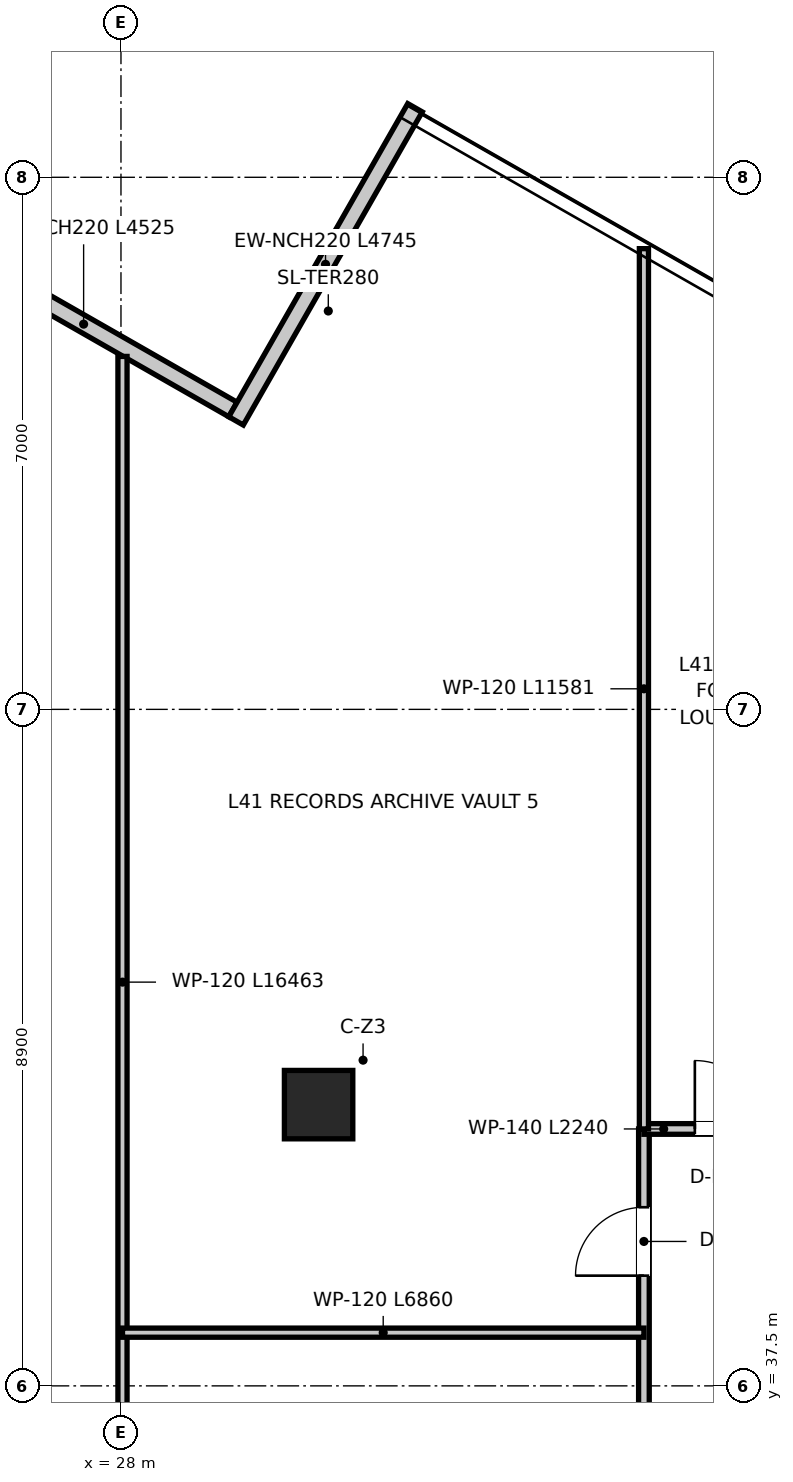
"""IFC4 building model, lengths in metres.
Left out: names, types, materials, properties, quantities, classifications, styles, units other than length and angle.
Written with IfcOpenShell. Run it as: python <this file> out.ifc"""

import sys

from ifc_helpers import new_model, si_unit, direction, frame, frame_2d, origin, origin_2d, place, context, subcontext, project, spatial, rectangle, extrude, source, transform, mapped, element, fill, save


model = new_model("IFC4")
c1 = context("Model", 3, precision=1e-05, world=origin(), true_north=direction((0.0, 1.0)))
c2 = subcontext(c1, "Body", "Model", "MODEL_VIEW")
j1 = project(units=[si_unit("LENGTHUNIT", "METRE"), si_unit("PLANEANGLEUNIT", "RADIAN")], contexts=[c1])
p1 = place(None, origin())
s1 = spatial("IfcSite", under=j1, at=p1, CompositionType="ELEMENT")
p2 = place(p1, origin())
s2 = spatial("IfcBuilding", under=s1, at=p2, CompositionType="ELEMENT")
p3 = place(p2, frame((0.0, 0.0, 169.9)))
s3 = spatial("IfcBuildingStorey", under=s2, at=p3, CompositionType="ELEMENT", Elevation=169.9)
m1 = source(origin(), c2, "Body", "SweptSolid", [
    extrude(rectangle(XDim=0.9, YDim=0.9, at=origin_2d()), origin(), (0.0, 0.0, 1.0), 3.95),
])
p4 = place(p3, frame((30.6, 41.2, 0.0), z_axis=(0.0, 0.0, 1.0), x_axis=(1.0, 0.0, 0.0)))
e1 = element("IfcColumn", 1, at=p4, inside=s3, PredefinedType="COLUMN", context=c2, shape_type="MappedRepresentation", body=[
    mapped(m1, transform((0.0, 0.0, 0.0), x_axis=(1.0, 0.0, 0.0), y_axis=(0.0, 1.0, 0.0), z_axis=(0.0, 0.0, 1.0), scale=1.0)),
])
p5 = place(p3, frame((29.473, 50.345, 0.0), z_axis=(0.0, 0.0, 1.0), x_axis=(-0.868170087613, 0.496266761908, 0.0)))
e2 = element("IfcWall", 2, at=p5, inside=s3, PredefinedType="ELEMENTEDWALL", context=c2, shape_type="SweptSolid", body=[
    extrude(rectangle(XDim=4.525, YDim=0.22, at=frame_2d((2.262, 0.0))), origin(), (0.0, 0.0, 1.0), 3.67),
])
p6 = place(p3, frame((31.868, 54.315, 0.0), z_axis=(0.0, 0.0, 1.0), x_axis=(-0.496205429031, -0.868205144076, 0.0)))
e3 = element("IfcWall", 3, at=p6, inside=s3, PredefinedType="ELEMENTEDWALL", context=c2, shape_type="SweptSolid", body=[
    extrude(rectangle(XDim=4.745, YDim=0.22, at=frame_2d((2.373, 0.0))), origin(), (0.0, 0.0, 1.0), 3.67),
])
p7 = place(p3, frame((34.88, 29.12, 0.0), z_axis=(0.0, 0.0, 1.0), x_axis=(0.0, 1.0, 0.0)))
e4 = element("IfcWall", 4, at=p7, inside=s3, PredefinedType="PARTITIONING", context=c2, shape_type="SweptSolid", body=[
    extrude(rectangle(XDim=11.76, YDim=0.14, at=frame_2d((5.88, 0.0))), origin(), (0.0, 0.0, 1.0), 3.03),
])
p8 = place(p7, frame((4.085, 0.0, 0.0)))
e5 = element("IfcOpeningElement", 5, at=p8, cuts=e4, PredefinedType="OPENING", context=c2, shape_type="SweptSolid", body=[
    extrude(rectangle(XDim=0.95, YDim=2.1, at=frame_2d((0.475, 1.05))), frame((0.0, 0.08, 0.0), z_axis=(0.0, -1.0, 0.0), x_axis=(1.0, 0.0, 0.0)), (0.0, 0.0, 1.0), 0.16),
])
p9 = place(p7, frame((6.82, 0.0, 0.0)))
e6 = element("IfcOpeningElement", 6, at=p9, cuts=e4, PredefinedType="OPENING", context=c2, shape_type="SweptSolid", body=[
    extrude(rectangle(XDim=0.9, YDim=2.1, at=frame_2d((0.45, 1.05))), frame((0.0, 0.08, 0.0), z_axis=(0.0, -1.0, 0.0), x_axis=(1.0, 0.0, 0.0)), (0.0, 0.0, 1.0), 0.16),
])
p10 = place(p7, frame((9.83, 0.0, 0.0)))
e7 = element("IfcOpeningElement", 7, at=p10, cuts=e4, PredefinedType="OPENING", context=c2, shape_type="SweptSolid", body=[
    extrude(rectangle(XDim=0.9, YDim=2.1, at=frame_2d((0.45, 1.05))), frame((0.0, 0.08, 0.0), z_axis=(0.0, -1.0, 0.0), x_axis=(1.0, 0.0, 0.0)), (0.0, 0.0, 1.0), 0.16),
])
p11 = place(p3, frame((34.88, 40.88, 0.0), z_axis=(0.0, 0.0, 1.0), x_axis=(1.0, 0.0, 0.0)))
e8 = element("IfcWall", 8, at=p11, inside=s3, PredefinedType="PARTITIONING", context=c2, shape_type="SweptSolid", body=[
    extrude(rectangle(XDim=2.24, YDim=0.14, at=frame_2d((1.12, 0.0))), origin(), (0.0, 0.0, 1.0), 3.67),
])
p12 = place(p11, frame((0.67, 0.0, 0.0)))
e9 = element("IfcOpeningElement", 9, at=p12, cuts=e8, PredefinedType="OPENING", context=c2, shape_type="SweptSolid", body=[
    extrude(rectangle(XDim=0.9, YDim=2.1, at=frame_2d((0.45, 1.05))), frame((0.0, 0.08, 0.0), z_axis=(0.0, -1.0, 0.0), x_axis=(1.0, 0.0, 0.0)), (0.0, 0.0, 1.0), 0.16),
])
p13 = place(p3, frame((34.88, 40.88, 0.0), z_axis=(0.0, 0.0, 1.0), x_axis=(0.0, 1.0, 0.0)))
e10 = element("IfcWall", 10, at=p13, inside=s3, PredefinedType="PARTITIONING", context=c2, shape_type="SweptSolid", body=[
    extrude(rectangle(XDim=11.581, YDim=0.12, at=frame_2d((5.791, 0.0))), origin(), (0.0, 0.0, 1.0), 3.28),
])
p14 = place(p3, frame((28.02, 34.58, 0.0), z_axis=(0.0, 0.0, 1.0), x_axis=(0.0, 1.0, 0.0)))
e11 = element("IfcWall", 11, at=p14, inside=s3, PredefinedType="PARTITIONING", context=c2, shape_type="SweptSolid", body=[
    extrude(rectangle(XDim=16.463, YDim=0.12, at=frame_2d((8.231, 0.0))), origin(), (0.0, 0.0, 1.0), 3.03),
])
p15 = place(p3, frame((28.02, 38.2, 0.0), z_axis=(0.0, 0.0, 1.0), x_axis=(1.0, 0.0, 0.0)))
e12 = element("IfcWall", 12, at=p15, inside=s3, PredefinedType="PARTITIONING", context=c2, shape_type="SweptSolid", body=[
    extrude(rectangle(XDim=6.86, YDim=0.12, at=frame_2d((3.43, 0.0))), origin(), (0.0, 0.0, 1.0), 3.08),
])
p16 = place(p12, origin())
e13 = element("IfcDoor", 13, at=p16, inside=s3, OperationType="SINGLE_SWING_LEFT", PredefinedType="DOOR", context=c2, shape_type="SweptSolid", body=[
    extrude(rectangle(XDim=0.9, YDim=2.1, at=frame_2d((0.45, 1.05))), frame((0.0, 0.025, 0.0), z_axis=(0.0, -1.0, 0.0), x_axis=(1.0, 0.0, 0.0)), (0.0, 0.0, 1.0), 0.05),
])
fill(e9, e13)
p17 = place(p10, origin())
e14 = element("IfcDoor", 14, at=p17, inside=s3, OperationType="SINGLE_SWING_LEFT", PredefinedType="DOOR", context=c2, shape_type="SweptSolid", body=[
    extrude(rectangle(XDim=0.9, YDim=2.1, at=frame_2d((0.45, 1.05))), frame((0.0, 0.025, 0.0), z_axis=(0.0, -1.0, 0.0), x_axis=(1.0, 0.0, 0.0)), (0.0, 0.0, 1.0), 0.05),
])
fill(e7, e14)
save(model, sys.argv[1])
